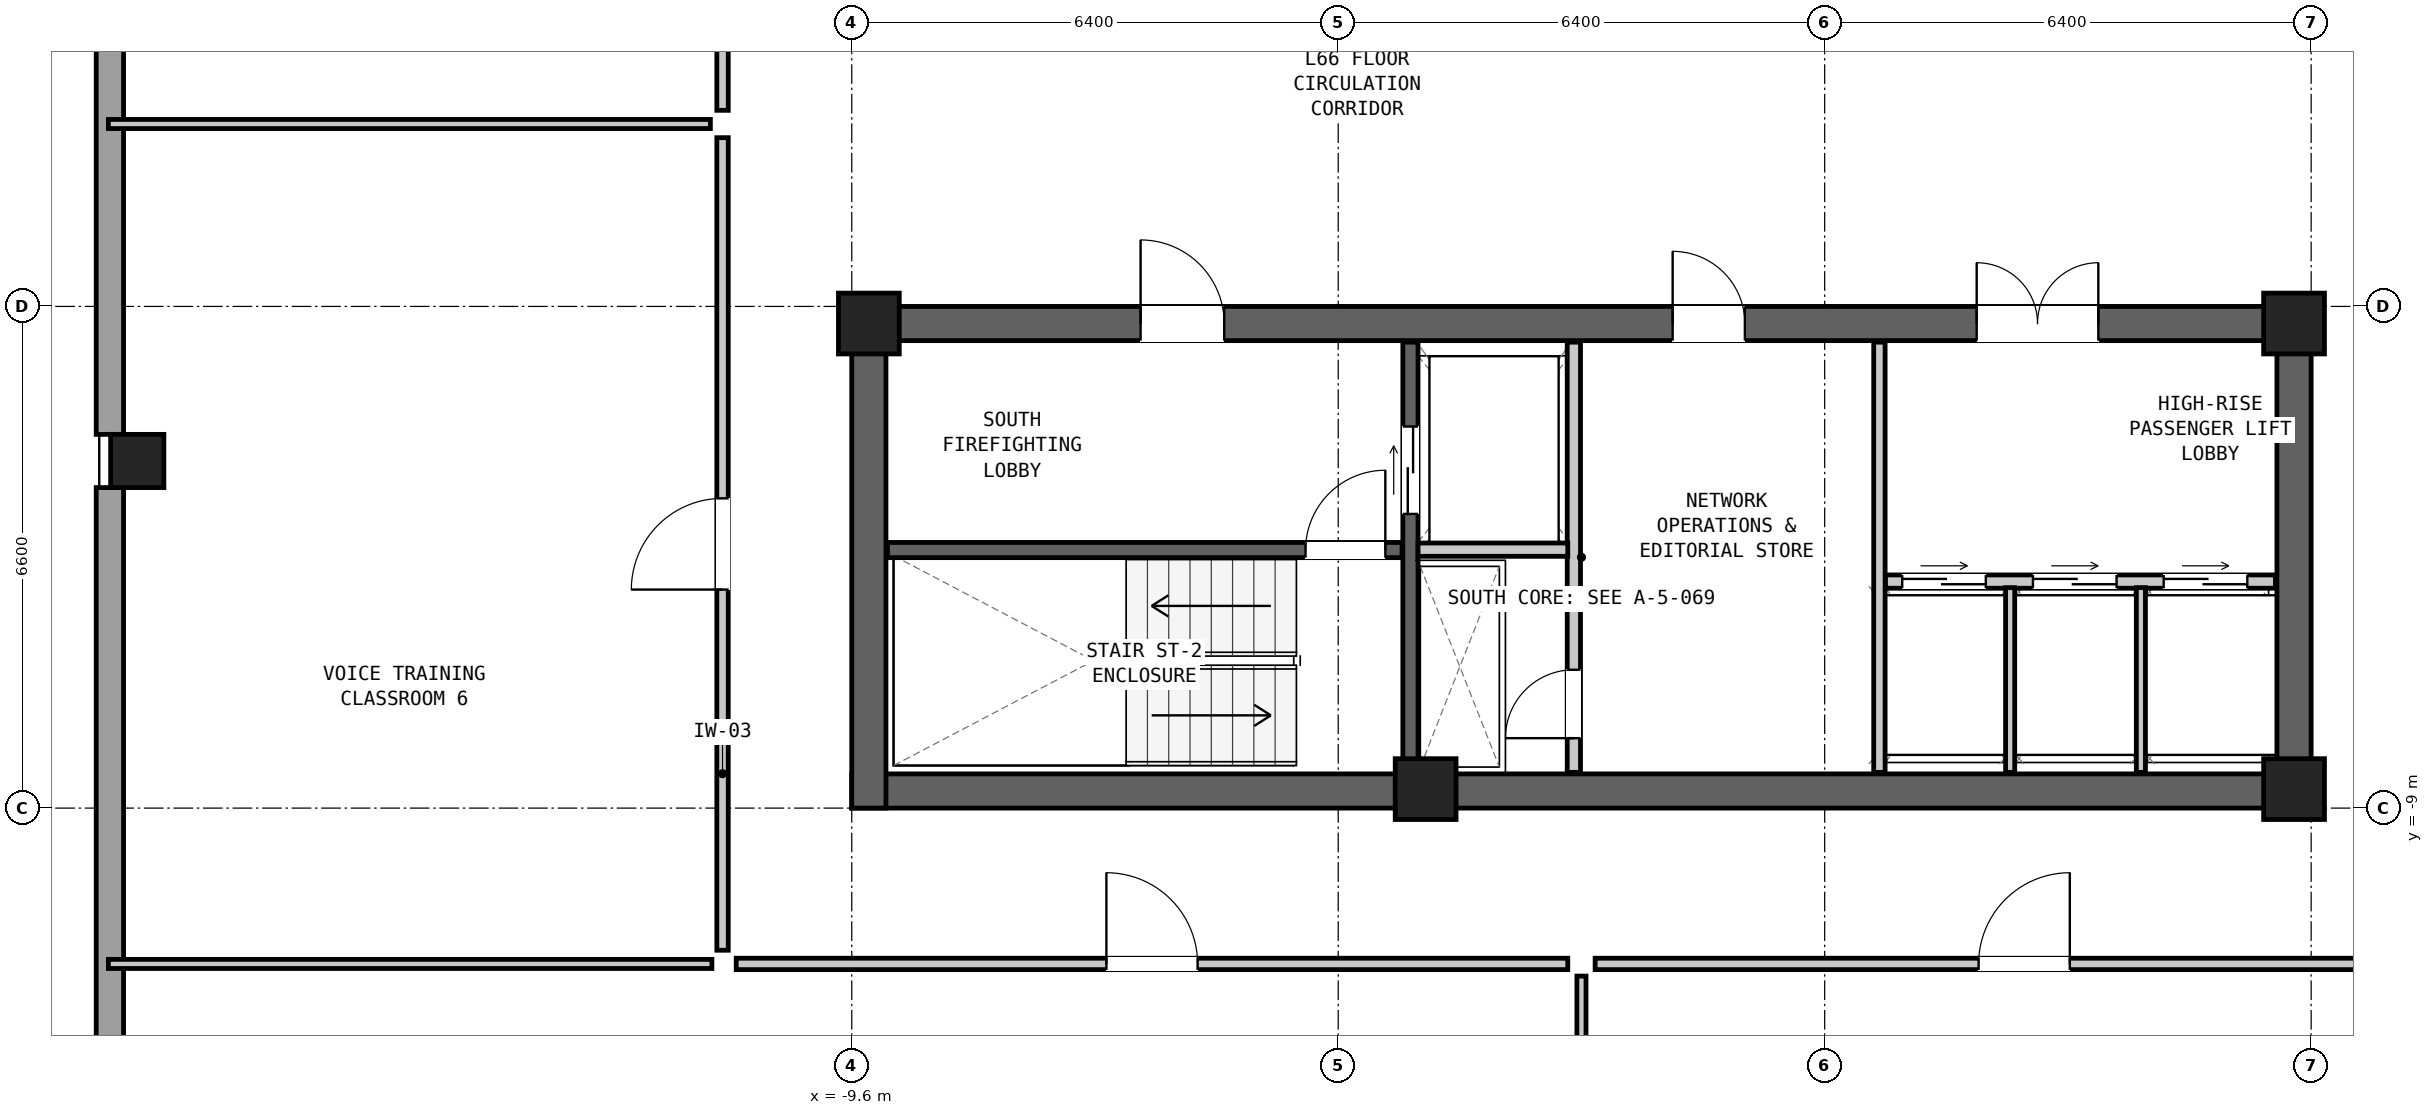
"""IFC4 building model, lengths in metres.
Left out: names, types, materials, properties, quantities, classifications, styles, units other than length and angle.
Written with IfcOpenShell. Run it as: python <this file> out.ifc"""

import sys

from ifc_helpers import new_model, si_unit, direction, frame, frame_2d, origin, origin_2d, place, context, subcontext, project, spatial, rectangle, hollow_rectangle, extrude, element, fill, save


model = new_model("IFC4")
c1 = context("Model", 3, precision=1e-05, world=origin(), true_north=direction((0.0, 1.0)))
c2 = subcontext(c1, "Body", "Model", "MODEL_VIEW")
j1 = project(units=[si_unit("LENGTHUNIT", "METRE"), si_unit("PLANEANGLEUNIT", "RADIAN")], contexts=[c1])
p1 = place(None, origin())
s1 = spatial("IfcSite", under=j1, at=p1, CompositionType="ELEMENT")
p2 = place(p1, origin())
s2 = spatial("IfcBuilding", under=s1, at=p2, CompositionType="ELEMENT")
p3 = place(p2, frame((0.0, 0.0, 223.9)))
s3 = spatial("IfcBuildingStorey", under=s2, at=p3, CompositionType="ELEMENT", Elevation=223.9)
p4 = place(p3, frame((-9.6, -8.775, 0.0), z_axis=(0.0, 0.0, 1.0), x_axis=(1.0, 0.0, 0.0)))
e1 = element("IfcWall", 1, at=p4, inside=s3, PredefinedType="SHEAR", context=c2, shape_type="SweptSolid", body=[
    extrude(rectangle(XDim=19.2, YDim=0.45, at=frame_2d((9.6, 0.0))), origin(), (0.0, 0.0, 1.0), 3.05),
])
p5 = place(p3, frame((-9.6, -2.625, 0.0), z_axis=(0.0, 0.0, 1.0), x_axis=(1.0, 0.0, 0.0)))
e2 = element("IfcWall", 2, at=p5, inside=s3, PredefinedType="SHEAR", context=c2, shape_type="SweptSolid", body=[
    extrude(rectangle(XDim=19.2, YDim=0.45, at=frame_2d((9.6, 0.0))), origin(), (0.0, 0.0, 1.0), 3.05),
])
p6 = place(p5, frame((3.8, 0.0, 0.0)))
e3 = element("IfcOpeningElement", 3, at=p6, cuts=e2, PredefinedType="OPENING", context=c2, shape_type="SweptSolid", body=[
    extrude(rectangle(XDim=1.1, YDim=2.08, at=frame_2d((0.55, 1.04))), frame((0.0, 0.237, 0.0), z_axis=(0.0, -1.0, 0.0), x_axis=(1.0, 0.0, 0.0)), (0.0, 0.0, 1.0), 0.474),
])
p7 = place(p5, frame((10.8, 0.0, 0.0)))
e4 = element("IfcOpeningElement", 4, at=p7, cuts=e2, PredefinedType="OPENING", context=c2, shape_type="SweptSolid", body=[
    extrude(rectangle(XDim=0.95, YDim=2.1, at=frame_2d((0.475, 1.05))), frame((0.0, 0.237, 0.0), z_axis=(0.0, -1.0, 0.0), x_axis=(1.0, 0.0, 0.0)), (0.0, 0.0, 1.0), 0.474),
])
p8 = place(p5, frame((14.8, 0.0, 0.0)))
e5 = element("IfcOpeningElement", 5, at=p8, cuts=e2, PredefinedType="OPENING", context=c2, shape_type="SweptSolid", body=[
    extrude(rectangle(XDim=1.6, YDim=2.12, at=frame_2d((0.8, 1.06))), frame((0.0, 0.237, 0.0), z_axis=(0.0, -1.0, 0.0), x_axis=(1.0, 0.0, 0.0)), (0.0, 0.0, 1.0), 0.474),
])
for number, where, z_axis, x_axis in (
    (6, (-9.375, -9.0, 0.0), (0.0, 0.0, 1.0), (0.0, 1.0, 0.0)),
    (7, (9.375, -9.0, 0.0), (0.0, 0.0, 1.0), (0.0, 1.0, 0.0)),
):
    element("IfcWall", number, at=place(p3, frame(where, z_axis=z_axis, x_axis=x_axis)), inside=s3, PredefinedType="SHEAR", context=c2, shape_type="SweptSolid", body=[
        extrude(rectangle(XDim=6.6, YDim=0.45, at=frame_2d((3.3, 0.0))), origin(), (0.0, 0.0, 1.0), 3.05),
    ])
p9 = place(p3, frame((-19.0, -4.433, 0.0), z_axis=(0.0, 0.0, 1.0), x_axis=(0.0, 1.0, 0.0)))
e8 = element("IfcColumn", 8, at=p9, inside=s3, PredefinedType="COLUMN", context=c2, shape_type="SweptSolid", body=[
    extrude(hollow_rectangle(XDim=0.7, YDim=0.7, WallThickness=0.045, at=origin_2d()), origin(), (0.0, 0.0, 1.0), 3.05),
])
for number, where, z_axis, x_axis in (
    (9, (-9.375, -2.625, 0.0), (0.0, 0.0, 1.0), (1.0, 0.0, 0.0)),
    (10, (9.375, -2.625, 0.0), (0.0, 0.0, 1.0), (1.0, 0.0, 0.0)),
    (11, (-2.05, -8.75, 0.0), (0.0, 0.0, 1.0), (1.0, 0.0, 0.0)),
    (12, (9.375, -8.75, 0.0), (0.0, 0.0, 1.0), (1.0, 0.0, 0.0)),
):
    element("IfcColumn", number, at=place(p3, frame(where, z_axis=z_axis, x_axis=x_axis)), inside=s3, PredefinedType="COLUMN", context=c2, shape_type="SweptSolid", body=[
        extrude(rectangle(XDim=0.8, YDim=0.8, at=origin_2d()), origin(), (0.0, 0.0, 1.0), 3.05),
    ])
p10 = place(p3, frame((-19.36, -12.962, 0.0), z_axis=(0.0, 0.0, 1.0), x_axis=(0.0, 1.0, 0.0)))
e13 = element("IfcWall", 13, at=p10, inside=s3, PredefinedType="SOLIDWALL", context=c2, shape_type="SweptSolid", body=[
    extrude(rectangle(XDim=8.179, YDim=0.36, at=frame_2d((4.089, 0.0))), origin(), (0.0, 0.0, 1.0), 0.98),
])
p11 = place(p3, frame((-19.36, -4.083, 0.0), z_axis=(0.0, 0.0, 1.0), x_axis=(0.0, 1.0, 0.0)))
e14 = element("IfcWall", 14, at=p11, inside=s3, PredefinedType="SOLIDWALL", context=c2, shape_type="SweptSolid", body=[
    extrude(rectangle(XDim=8.167, YDim=0.36, at=frame_2d((4.083, 0.0))), origin(), (0.0, 0.0, 1.0), 0.98),
])
p12 = place(p3, frame((-9.13, -5.605, 0.0), z_axis=(0.0, 0.0, 1.0), x_axis=(1.0, 0.0, 0.0)))
e15 = element("IfcWall", 15, at=p12, inside=s3, PredefinedType="SHEAR", context=c2, shape_type="SweptSolid", body=[
    extrude(rectangle(XDim=6.77, YDim=0.2, at=frame_2d((3.385, 0.0))), origin(), (0.0, 0.0, 1.0), 2.86),
])
p13 = place(p12, frame((5.5, 0.0, 0.0)))
e16 = element("IfcOpeningElement", 16, at=p13, cuts=e15, PredefinedType="OPENING", context=c2, shape_type="SweptSolid", body=[
    extrude(rectangle(XDim=1.05, YDim=2.08, at=frame_2d((0.525, 1.04))), frame((0.0, 0.112, 0.0), z_axis=(0.0, -1.0, 0.0), x_axis=(1.0, 0.0, 0.0)), (0.0, 0.0, 1.0), 0.224),
])
p14 = place(p3, frame((-2.25, -8.53, 0.0), z_axis=(0.0, 0.0, 1.0), x_axis=(0.0, 1.0, 0.0)))
e17 = element("IfcWall", 17, at=p14, inside=s3, PredefinedType="SHEAR", context=c2, shape_type="SweptSolid", body=[
    extrude(rectangle(XDim=5.66, YDim=0.2, at=frame_2d((2.83, 0.0))), origin(), (0.0, 0.0, 1.0), 2.86),
])
p15 = place(p14, frame((3.4, 0.0, 0.0)))
e18 = element("IfcOpeningElement", 18, at=p15, cuts=e17, PredefinedType="OPENING", context=c2, shape_type="SweptSolid", body=[
    extrude(rectangle(XDim=1.15, YDim=2.08, at=frame_2d((0.575, 1.04))), frame((0.0, 0.112, 0.0), z_axis=(0.0, -1.0, 0.0), x_axis=(1.0, 0.0, 0.0)), (0.0, 0.0, 1.0), 0.224),
])
p16 = place(p3, frame((-0.1, -8.53, 0.0), z_axis=(0.0, 0.0, 1.0), x_axis=(0.0, 1.0, 0.0)))
e19 = element("IfcWall", 19, at=p16, inside=s3, PredefinedType="PARTITIONING", context=c2, shape_type="SweptSolid", body=[
    extrude(rectangle(XDim=5.66, YDim=0.175, at=frame_2d((2.83, 0.0))), origin(), (0.0, 0.0, 1.0), 2.86),
])
p17 = place(p16, frame((0.45, 0.0, 0.0)))
e20 = element("IfcOpeningElement", 20, at=p17, cuts=e19, PredefinedType="OPENING", context=c2, shape_type="SweptSolid", body=[
    extrude(rectangle(XDim=0.9, YDim=2.05, at=frame_2d((0.45, 1.025))), frame((0.0, 0.1, 0.0), z_axis=(0.0, -1.0, 0.0), x_axis=(1.0, 0.0, 0.0)), (0.0, 0.0, 1.0), 0.199),
])
p18 = place(p3, frame((-2.15, -5.6, 0.0), z_axis=(0.0, 0.0, 1.0), x_axis=(1.0, 0.0, 0.0)))
e21 = element("IfcWall", 21, at=p18, inside=s3, PredefinedType="PARTITIONING", context=c2, shape_type="SweptSolid", body=[
    extrude(rectangle(XDim=1.97, YDim=0.175, at=frame_2d((0.985, 0.0))), origin(), (0.0, 0.0, 1.0), 2.86),
])
p19 = place(p3, frame((3.92, -8.53, 0.0), z_axis=(0.0, 0.0, 1.0), x_axis=(0.0, 1.0, 0.0)))
e22 = element("IfcWall", 22, at=p19, inside=s3, PredefinedType="PARTITIONING", context=c2, shape_type="SweptSolid", body=[
    extrude(rectangle(XDim=5.66, YDim=0.15, at=frame_2d((2.83, 0.0))), origin(), (0.0, 0.0, 1.0), 2.86),
])
p20 = place(p3, frame((4.0, -6.02, 0.0), z_axis=(0.0, 0.0, 1.0), x_axis=(1.0, 0.0, 0.0)))
e23 = element("IfcWall", 23, at=p20, inside=s3, PredefinedType="PARTITIONING", context=c2, shape_type="SweptSolid", body=[
    extrude(rectangle(XDim=5.13, YDim=0.175, at=frame_2d((2.565, 0.0))), origin(), (0.0, 0.0, 1.0), 2.86),
])
p21 = place(p20, frame((0.22, 0.0, 0.0)))
e24 = element("IfcOpeningElement", 24, at=p21, cuts=e23, PredefinedType="OPENING", context=c2, shape_type="SweptSolid", body=[
    extrude(rectangle(XDim=1.1, YDim=2.06, at=frame_2d((0.55, 1.03))), frame((0.0, 0.1, 0.0), z_axis=(0.0, -1.0, 0.0), x_axis=(1.0, 0.0, 0.0)), (0.0, 0.0, 1.0), 0.199),
])
p22 = place(p20, frame((1.94, 0.0, 0.0)))
e25 = element("IfcOpeningElement", 25, at=p22, cuts=e23, PredefinedType="OPENING", context=c2, shape_type="SweptSolid", body=[
    extrude(rectangle(XDim=1.1, YDim=2.06, at=frame_2d((0.55, 1.03))), frame((0.0, 0.1, 0.0), z_axis=(0.0, -1.0, 0.0), x_axis=(1.0, 0.0, 0.0)), (0.0, 0.0, 1.0), 0.199),
])
p23 = place(p20, frame((3.66, 0.0, 0.0)))
e26 = element("IfcOpeningElement", 26, at=p23, cuts=e23, PredefinedType="OPENING", context=c2, shape_type="SweptSolid", body=[
    extrude(rectangle(XDim=1.1, YDim=2.06, at=frame_2d((0.55, 1.03))), frame((0.0, 0.1, 0.0), z_axis=(0.0, -1.0, 0.0), x_axis=(1.0, 0.0, 0.0)), (0.0, 0.0, 1.0), 0.199),
])
for number, where, z_axis, x_axis in (
    (27, (5.64, -8.53, 0.0), (0.0, 0.0, 1.0), (0.0, 1.0, 0.0)),
    (28, (7.36, -8.53, 0.0), (0.0, 0.0, 1.0), (0.0, 1.0, 0.0)),
):
    element("IfcWall", number, at=place(p3, frame(where, z_axis=z_axis, x_axis=x_axis)), inside=s3, PredefinedType="PARTITIONING", context=c2, shape_type="SweptSolid", body=[
        extrude(rectangle(XDim=2.43, YDim=0.12, at=frame_2d((1.215, 0.0))), origin(), (0.0, 0.0, 1.0), 2.86),
    ])
p24 = place(p3, frame((-19.38, -11.05, 0.0), z_axis=(0.0, 0.0, 1.0), x_axis=(1.0, 0.0, 0.0)))
e29 = element("IfcWall", 29, at=p24, inside=s3, PredefinedType="PARTITIONING", context=c2, shape_type="SweptSolid", body=[
    extrude(rectangle(XDim=7.94, YDim=0.12, at=frame_2d((3.97, 0.0))), origin(), (0.0, 0.0, 1.0), 2.86),
])
p25 = place(p3, frame((0.0, -19.38, 0.0), z_axis=(0.0, 0.0, 1.0), x_axis=(0.0, 1.0, 0.0)))
e30 = element("IfcWall", 30, at=p25, inside=s3, PredefinedType="PARTITIONING", context=c2, shape_type="SweptSolid", body=[
    extrude(rectangle(XDim=8.17, YDim=0.12, at=frame_2d((4.085, 0.0))), origin(), (0.0, 0.0, 1.0), 2.381),
])
p26 = place(p3, frame((-19.38, 0.0, 0.0), z_axis=(0.0, 0.0, 1.0), x_axis=(1.0, 0.0, 0.0)))
e31 = element("IfcWall", 31, at=p26, inside=s3, PredefinedType="PARTITIONING", context=c2, shape_type="SweptSolid", body=[
    extrude(rectangle(XDim=7.92, YDim=0.12, at=frame_2d((3.96, 0.0))), origin(), (0.0, 0.0, 1.0), 2.86),
])
p27 = place(p3, frame((-11.12, -11.05, 0.0), z_axis=(0.0, 0.0, 1.0), x_axis=(1.0, 0.0, 0.0)))
e32 = element("IfcWall", 32, at=p27, inside=s3, PredefinedType="PARTITIONING", context=c2, shape_type="SweptSolid", body=[
    extrude(rectangle(XDim=10.94, YDim=0.15, at=frame_2d((5.47, 0.0))), origin(), (0.0, 0.0, 1.0), 2.86),
])
p28 = place(p27, frame((4.87, 0.0, 0.0)))
e33 = element("IfcOpeningElement", 33, at=p28, cuts=e32, PredefinedType="OPENING", context=c2, shape_type="SweptSolid", body=[
    extrude(rectangle(XDim=1.2, YDim=2.1, at=frame_2d((0.6, 1.05))), frame((0.0, 0.087, 0.0), z_axis=(0.0, -1.0, 0.0), x_axis=(1.0, 0.0, 0.0)), (0.0, 0.0, 1.0), 0.174),
])
p29 = place(p3, frame((0.18, -11.05, 0.0), z_axis=(0.0, 0.0, 1.0), x_axis=(1.0, 0.0, 0.0)))
e34 = element("IfcWall", 34, at=p29, inside=s3, PredefinedType="PARTITIONING", context=c2, shape_type="SweptSolid", body=[
    extrude(rectangle(XDim=11.29, YDim=0.15, at=frame_2d((5.645, 0.0))), origin(), (0.0, 0.0, 1.0), 2.86),
])
p30 = place(p29, frame((5.045, 0.0, 0.0)))
e35 = element("IfcOpeningElement", 35, at=p30, cuts=e34, PredefinedType="OPENING", context=c2, shape_type="SweptSolid", body=[
    extrude(rectangle(XDim=1.2, YDim=2.1, at=frame_2d((0.6, 1.05))), frame((0.0, 0.087, 0.0), z_axis=(0.0, -1.0, 0.0), x_axis=(1.0, 0.0, 0.0)), (0.0, 0.0, 1.0), 0.174),
])
p31 = place(p3, frame((-11.3, -10.87, 0.0), z_axis=(0.0, 0.0, 1.0), x_axis=(0.0, 1.0, 0.0)))
e36 = element("IfcWall", 36, at=p31, inside=s3, PredefinedType="PARTITIONING", context=c2, shape_type="SweptSolid", body=[
    extrude(rectangle(XDim=10.69, YDim=0.15, at=frame_2d((5.345, 0.0))), origin(), (0.0, 0.0, 1.0), 2.86),
])
p32 = place(p31, frame((4.745, 0.0, 0.0)))
e37 = element("IfcOpeningElement", 37, at=p32, cuts=e36, PredefinedType="OPENING", context=c2, shape_type="SweptSolid", body=[
    extrude(rectangle(XDim=1.2, YDim=2.1, at=frame_2d((0.6, 1.05))), frame((0.0, 0.087, 0.0), z_axis=(0.0, -1.0, 0.0), x_axis=(1.0, 0.0, 0.0)), (0.0, 0.0, 1.0), 0.174),
])
p33 = place(p3, frame((-11.3, 0.18, 0.0), z_axis=(0.0, 0.0, 1.0), x_axis=(0.0, 1.0, 0.0)))
e38 = element("IfcWall", 38, at=p33, inside=s3, PredefinedType="PARTITIONING", context=c2, shape_type="SweptSolid", body=[
    extrude(rectangle(XDim=11.89, YDim=0.15, at=frame_2d((5.945, 0.0))), origin(), (0.0, 0.0, 1.0), 2.86),
])
p34 = place(p33, frame((5.345, 0.0, 0.0)))
e39 = element("IfcOpeningElement", 39, at=p34, cuts=e38, PredefinedType="OPENING", context=c2, shape_type="SweptSolid", body=[
    extrude(rectangle(XDim=1.2, YDim=2.1, at=frame_2d((0.6, 1.05))), frame((0.0, 0.087, 0.0), z_axis=(0.0, -1.0, 0.0), x_axis=(1.0, 0.0, 0.0)), (0.0, 0.0, 1.0), 0.174),
])
p35 = place(p13, origin())
e40 = element("IfcDoor", 40, at=p35, inside=s3, OperationType="SINGLE_SWING_RIGHT", PredefinedType="DOOR", context=c2, shape_type="SweptSolid", body=[
    extrude(rectangle(XDim=1.05, YDim=2.08, at=frame_2d((0.525, 1.04))), frame((0.0, 0.025, 0.0), z_axis=(0.0, -1.0, 0.0), x_axis=(1.0, 0.0, 0.0)), (0.0, 0.0, 1.0), 0.05),
])
fill(e16, e40)
p36 = place(p6, origin())
e41 = element("IfcDoor", 41, at=p36, inside=s3, OperationType="SINGLE_SWING_LEFT", PredefinedType="DOOR", context=c2, shape_type="SweptSolid", body=[
    extrude(rectangle(XDim=1.1, YDim=2.08, at=frame_2d((0.55, 1.04))), frame((0.0, 0.025, 0.0), z_axis=(0.0, -1.0, 0.0), x_axis=(1.0, 0.0, 0.0)), (0.0, 0.0, 1.0), 0.05),
])
fill(e3, e41)
p37 = place(p15, origin())
e42 = element("IfcDoor", 42, at=p37, inside=s3, OperationType="DOUBLE_DOOR_SLIDING", PredefinedType="DOOR", context=c2, shape_type="SweptSolid", body=[
    extrude(rectangle(XDim=1.15, YDim=2.08, at=frame_2d((0.575, 1.04))), frame((0.0, 0.025, 0.0), z_axis=(0.0, -1.0, 0.0), x_axis=(1.0, 0.0, 0.0)), (0.0, 0.0, 1.0), 0.05),
])
fill(e18, e42)
p38 = place(p17, origin())
e43 = element("IfcDoor", 43, at=p38, inside=s3, OperationType="SINGLE_SWING_LEFT", PredefinedType="DOOR", context=c2, shape_type="SweptSolid", body=[
    extrude(rectangle(XDim=0.9, YDim=2.05, at=frame_2d((0.45, 1.025))), frame((0.0, 0.025, 0.0), z_axis=(0.0, -1.0, 0.0), x_axis=(1.0, 0.0, 0.0)), (0.0, 0.0, 1.0), 0.05),
])
fill(e20, e43)
p39 = place(p7, origin())
e44 = element("IfcDoor", 44, at=p39, inside=s3, OperationType="SINGLE_SWING_LEFT", PredefinedType="DOOR", context=c2, shape_type="SweptSolid", body=[
    extrude(rectangle(XDim=0.95, YDim=2.1, at=frame_2d((0.475, 1.05))), frame((0.0, 0.025, 0.0), z_axis=(0.0, -1.0, 0.0), x_axis=(1.0, 0.0, 0.0)), (0.0, 0.0, 1.0), 0.05),
])
fill(e4, e44)
p40 = place(p21, origin())
e45 = element("IfcDoor", 45, at=p40, inside=s3, OperationType="DOUBLE_DOOR_SLIDING", PredefinedType="DOOR", context=c2, shape_type="SweptSolid", body=[
    extrude(rectangle(XDim=1.1, YDim=2.06, at=frame_2d((0.55, 1.03))), frame((0.0, 0.025, 0.0), z_axis=(0.0, -1.0, 0.0), x_axis=(1.0, 0.0, 0.0)), (0.0, 0.0, 1.0), 0.05),
])
fill(e24, e45)
p41 = place(p22, origin())
e46 = element("IfcDoor", 46, at=p41, inside=s3, OperationType="DOUBLE_DOOR_SLIDING", PredefinedType="DOOR", context=c2, shape_type="SweptSolid", body=[
    extrude(rectangle(XDim=1.1, YDim=2.06, at=frame_2d((0.55, 1.03))), frame((0.0, 0.025, 0.0), z_axis=(0.0, -1.0, 0.0), x_axis=(1.0, 0.0, 0.0)), (0.0, 0.0, 1.0), 0.05),
])
fill(e25, e46)
p42 = place(p23, origin())
e47 = element("IfcDoor", 47, at=p42, inside=s3, OperationType="DOUBLE_DOOR_SLIDING", PredefinedType="DOOR", context=c2, shape_type="SweptSolid", body=[
    extrude(rectangle(XDim=1.1, YDim=2.06, at=frame_2d((0.55, 1.03))), frame((0.0, 0.025, 0.0), z_axis=(0.0, -1.0, 0.0), x_axis=(1.0, 0.0, 0.0)), (0.0, 0.0, 1.0), 0.05),
])
fill(e26, e47)
p43 = place(p8, origin())
e48 = element("IfcDoor", 48, at=p43, inside=s3, OperationType="DOUBLE_DOOR_SINGLE_SWING", PredefinedType="DOOR", context=c2, shape_type="SweptSolid", body=[
    extrude(rectangle(XDim=1.6, YDim=2.12, at=frame_2d((0.8, 1.06))), frame((0.0, 0.025, 0.0), z_axis=(0.0, -1.0, 0.0), x_axis=(1.0, 0.0, 0.0)), (0.0, 0.0, 1.0), 0.05),
])
fill(e5, e48)
p44 = place(p28, origin())
e49 = element("IfcDoor", 49, at=p44, inside=s3, OperationType="SINGLE_SWING_LEFT", PredefinedType="DOOR", context=c2, shape_type="SweptSolid", body=[
    extrude(rectangle(XDim=1.2, YDim=2.1, at=frame_2d((0.6, 1.05))), frame((0.0, 0.025, 0.0), z_axis=(0.0, -1.0, 0.0), x_axis=(1.0, 0.0, 0.0)), (0.0, 0.0, 1.0), 0.05),
])
fill(e33, e49)
p45 = place(p30, origin())
e50 = element("IfcDoor", 50, at=p45, inside=s3, OperationType="SINGLE_SWING_RIGHT", PredefinedType="DOOR", context=c2, shape_type="SweptSolid", body=[
    extrude(rectangle(XDim=1.2, YDim=2.1, at=frame_2d((0.6, 1.05))), frame((0.0, 0.025, 0.0), z_axis=(0.0, -1.0, 0.0), x_axis=(1.0, 0.0, 0.0)), (0.0, 0.0, 1.0), 0.05),
])
fill(e35, e50)
p46 = place(p32, origin())
e51 = element("IfcDoor", 51, at=p46, inside=s3, OperationType="SINGLE_SWING_LEFT", PredefinedType="DOOR", context=c2, shape_type="SweptSolid", body=[
    extrude(rectangle(XDim=1.2, YDim=2.1, at=frame_2d((0.6, 1.05))), frame((0.0, 0.025, 0.0), z_axis=(0.0, -1.0, 0.0), x_axis=(1.0, 0.0, 0.0)), (0.0, 0.0, 1.0), 0.05),
])
fill(e37, e51)
save(model, sys.argv[1])
